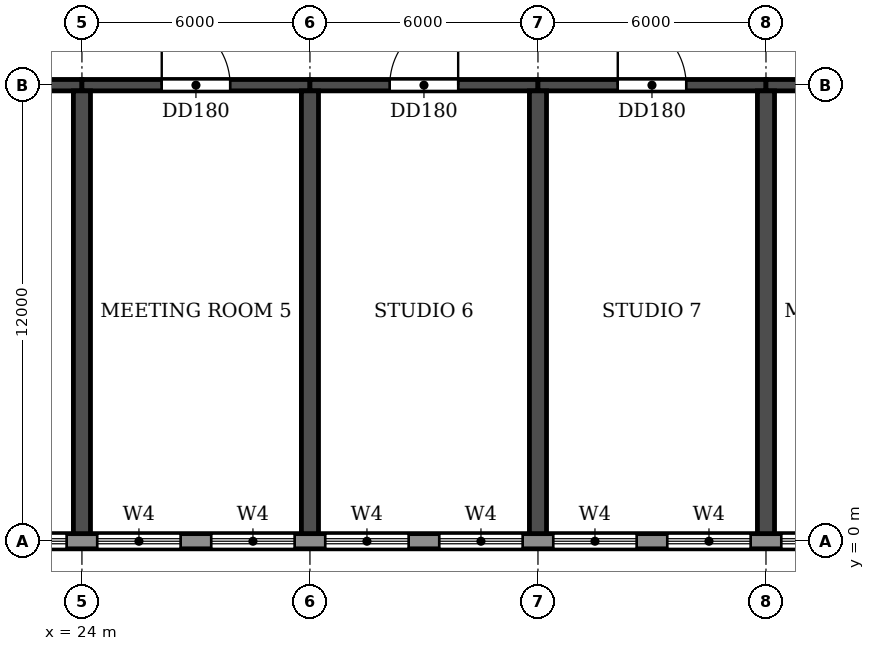
"""IFC4 building model, lengths in metres.
Left out: names, types, materials, properties, quantities, classifications, styles, units other than length and angle.
Written with IfcOpenShell. Run it as: python <this file> out.ifc"""

import sys

from ifc_helpers import new_model, si_unit, direction, frame, frame_2d, origin, place, context, subcontext, project, spatial, rectangle, extrude, element, fill, save


model = new_model("IFC4")
c1 = context("Model", 3, precision=1e-05, world=origin(), true_north=direction((0.0, 1.0)))
c2 = subcontext(c1, "Body", "Model", "MODEL_VIEW")
j1 = project(units=[si_unit("LENGTHUNIT", "METRE"), si_unit("PLANEANGLEUNIT", "RADIAN")], contexts=[c1])
p1 = place(None, origin())
s1 = spatial("IfcSite", under=j1, at=p1, CompositionType="ELEMENT")
p2 = place(p1, origin())
s2 = spatial("IfcBuilding", under=s1, at=p2, CompositionType="ELEMENT")
p3 = place(p2, frame((0.0, 0.0, 19.2)))
s3 = spatial("IfcBuildingStorey", under=s2, at=p3, CompositionType="ELEMENT", Elevation=19.2)
for number, where, z_axis, x_axis in (
    (1, (24.0, 0.2, 0.0), (0.0, 0.0, 1.0), (0.0, 1.0, 0.0)),
    (2, (30.0, 0.2, 0.0), (0.0, 0.0, 1.0), (0.0, 1.0, 0.0)),
    (3, (36.0, 0.2, 0.0), (0.0, 0.0, 1.0), (0.0, 1.0, 0.0)),
    (4, (42.0, 0.2, 0.0), (0.0, 0.0, 1.0), (0.0, 1.0, 0.0)),
):
    element("IfcWall", number, at=place(p3, frame(where, z_axis=z_axis, x_axis=x_axis)), inside=s3, PredefinedType="SHEAR", context=c2, shape_type="SweptSolid", body=[
        extrude(rectangle(XDim=11.65, YDim=0.45, at=frame_2d((5.825, 0.0))), origin(), (0.0, 0.0, 1.0), 3.95),
    ])
p4 = place(p3, frame((18.0, 12.0, 0.0), z_axis=(0.0, 0.0, 1.0), x_axis=(1.0, 0.0, 0.0)))
e5 = element("IfcWall", 5, at=p4, inside=s3, PredefinedType="SHEAR", context=c2, shape_type="SweptSolid", body=[
    extrude(rectangle(XDim=6.0, YDim=0.3, at=frame_2d((3.0, 0.0))), origin(), (0.0, 0.0, 1.0), 3.35),
])
p5 = place(p4, frame((2.1, 0.0, 0.0)))
e6 = element("IfcOpeningElement", 6, at=p5, cuts=e5, PredefinedType="OPENING", context=c2, shape_type="SweptSolid", body=[
    extrude(rectangle(XDim=1.8, YDim=2.1, at=frame_2d((0.9, 1.05))), frame((0.0, 0.16, 0.0), z_axis=(0.0, -1.0, 0.0), x_axis=(1.0, 0.0, 0.0)), (0.0, 0.0, 1.0), 0.32),
])
p6 = place(p3, frame((24.0, 12.0, 0.0), z_axis=(0.0, 0.0, 1.0), x_axis=(1.0, 0.0, 0.0)))
e7 = element("IfcWall", 7, at=p6, inside=s3, PredefinedType="SHEAR", context=c2, shape_type="SweptSolid", body=[
    extrude(rectangle(XDim=6.0, YDim=0.3, at=frame_2d((3.0, 0.0))), origin(), (0.0, 0.0, 1.0), 3.35),
])
p7 = place(p6, frame((2.1, 0.0, 0.0)))
e8 = element("IfcOpeningElement", 8, at=p7, cuts=e7, PredefinedType="OPENING", context=c2, shape_type="SweptSolid", body=[
    extrude(rectangle(XDim=1.8, YDim=2.1, at=frame_2d((0.9, 1.05))), frame((0.0, 0.16, 0.0), z_axis=(0.0, -1.0, 0.0), x_axis=(1.0, 0.0, 0.0)), (0.0, 0.0, 1.0), 0.32),
])
p8 = place(p3, frame((30.0, 12.0, 0.0), z_axis=(0.0, 0.0, 1.0), x_axis=(1.0, 0.0, 0.0)))
e9 = element("IfcWall", 9, at=p8, inside=s3, PredefinedType="SHEAR", context=c2, shape_type="SweptSolid", body=[
    extrude(rectangle(XDim=6.0, YDim=0.3, at=frame_2d((3.0, 0.0))), origin(), (0.0, 0.0, 1.0), 3.35),
])
p9 = place(p8, frame((2.1, 0.0, 0.0)))
e10 = element("IfcOpeningElement", 10, at=p9, cuts=e9, PredefinedType="OPENING", context=c2, shape_type="SweptSolid", body=[
    extrude(rectangle(XDim=1.8, YDim=2.1, at=frame_2d((0.9, 1.05))), frame((0.0, 0.16, 0.0), z_axis=(0.0, -1.0, 0.0), x_axis=(1.0, 0.0, 0.0)), (0.0, 0.0, 1.0), 0.32),
])
p10 = place(p3, frame((36.0, 12.0, 0.0), z_axis=(0.0, 0.0, 1.0), x_axis=(1.0, 0.0, 0.0)))
e11 = element("IfcWall", 11, at=p10, inside=s3, PredefinedType="SHEAR", context=c2, shape_type="SweptSolid", body=[
    extrude(rectangle(XDim=6.0, YDim=0.3, at=frame_2d((3.0, 0.0))), origin(), (0.0, 0.0, 1.0), 3.35),
])
p11 = place(p10, frame((2.1, 0.0, 0.0)))
e12 = element("IfcOpeningElement", 12, at=p11, cuts=e11, PredefinedType="OPENING", context=c2, shape_type="SweptSolid", body=[
    extrude(rectangle(XDim=1.8, YDim=2.1, at=frame_2d((0.9, 1.05))), frame((0.0, 0.16, 0.0), z_axis=(0.0, -1.0, 0.0), x_axis=(1.0, 0.0, 0.0)), (0.0, 0.0, 1.0), 0.32),
])
p12 = place(p3, frame((42.0, 12.0, 0.0), z_axis=(0.0, 0.0, 1.0), x_axis=(1.0, 0.0, 0.0)))
e13 = element("IfcWall", 13, at=p12, inside=s3, PredefinedType="SHEAR", context=c2, shape_type="SweptSolid", body=[
    extrude(rectangle(XDim=6.0, YDim=0.3, at=frame_2d((3.0, 0.0))), origin(), (0.0, 0.0, 1.0), 3.35),
])
p13 = place(p12, frame((2.1, 0.0, 0.0)))
e14 = element("IfcOpeningElement", 14, at=p13, cuts=e13, PredefinedType="OPENING", context=c2, shape_type="SweptSolid", body=[
    extrude(rectangle(XDim=1.8, YDim=2.1, at=frame_2d((0.9, 1.05))), frame((0.0, 0.16, 0.0), z_axis=(0.0, -1.0, 0.0), x_axis=(1.0, 0.0, 0.0)), (0.0, 0.0, 1.0), 0.32),
])
p14 = place(p3, frame((-3.0, 0.0, 0.0), z_axis=(0.0, 0.0, 1.0), x_axis=(1.0, 0.0, 0.0)))
e15 = element("IfcWall", 15, at=p14, inside=s3, PredefinedType="STANDARD", context=c2, shape_type="SweptSolid", body=[
    extrude(rectangle(XDim=108.0, YDim=0.4, at=frame_2d((54.0, 0.0))), origin(), (0.0, 0.0, 1.0), 3.95),
])
p15 = place(p14, frame((3.4, 0.0, 0.9)))
e16 = element("IfcOpeningElement", 16, at=p15, cuts=e15, PredefinedType="OPENING", context=c2, shape_type="SweptSolid", body=[
    extrude(rectangle(XDim=2.2, YDim=2.7, at=frame_2d((1.1, 1.35))), frame((0.0, 0.21, 0.0), z_axis=(0.0, -1.0, 0.0), x_axis=(1.0, 0.0, 0.0)), (0.0, 0.0, 1.0), 0.42),
])
p16 = place(p14, frame((6.4, 0.0, 0.9)))
e17 = element("IfcOpeningElement", 17, at=p16, cuts=e15, PredefinedType="OPENING", context=c2, shape_type="SweptSolid", body=[
    extrude(rectangle(XDim=2.2, YDim=2.7, at=frame_2d((1.1, 1.35))), frame((0.0, 0.21, 0.0), z_axis=(0.0, -1.0, 0.0), x_axis=(1.0, 0.0, 0.0)), (0.0, 0.0, 1.0), 0.42),
])
p17 = place(p14, frame((9.4, 0.0, 0.9)))
e18 = element("IfcOpeningElement", 18, at=p17, cuts=e15, PredefinedType="OPENING", context=c2, shape_type="SweptSolid", body=[
    extrude(rectangle(XDim=2.2, YDim=2.7, at=frame_2d((1.1, 1.35))), frame((0.0, 0.21, 0.0), z_axis=(0.0, -1.0, 0.0), x_axis=(1.0, 0.0, 0.0)), (0.0, 0.0, 1.0), 0.42),
])
p18 = place(p14, frame((12.4, 0.0, 0.9)))
e19 = element("IfcOpeningElement", 19, at=p18, cuts=e15, PredefinedType="OPENING", context=c2, shape_type="SweptSolid", body=[
    extrude(rectangle(XDim=2.2, YDim=2.7, at=frame_2d((1.1, 1.35))), frame((0.0, 0.21, 0.0), z_axis=(0.0, -1.0, 0.0), x_axis=(1.0, 0.0, 0.0)), (0.0, 0.0, 1.0), 0.42),
])
p19 = place(p14, frame((15.4, 0.0, 0.9)))
e20 = element("IfcOpeningElement", 20, at=p19, cuts=e15, PredefinedType="OPENING", context=c2, shape_type="SweptSolid", body=[
    extrude(rectangle(XDim=2.2, YDim=2.7, at=frame_2d((1.1, 1.35))), frame((0.0, 0.21, 0.0), z_axis=(0.0, -1.0, 0.0), x_axis=(1.0, 0.0, 0.0)), (0.0, 0.0, 1.0), 0.42),
])
p20 = place(p14, frame((18.4, 0.0, 0.9)))
e21 = element("IfcOpeningElement", 21, at=p20, cuts=e15, PredefinedType="OPENING", context=c2, shape_type="SweptSolid", body=[
    extrude(rectangle(XDim=2.2, YDim=2.7, at=frame_2d((1.1, 1.35))), frame((0.0, 0.21, 0.0), z_axis=(0.0, -1.0, 0.0), x_axis=(1.0, 0.0, 0.0)), (0.0, 0.0, 1.0), 0.42),
])
p21 = place(p14, frame((21.4, 0.0, 0.9)))
e22 = element("IfcOpeningElement", 22, at=p21, cuts=e15, PredefinedType="OPENING", context=c2, shape_type="SweptSolid", body=[
    extrude(rectangle(XDim=2.2, YDim=2.7, at=frame_2d((1.1, 1.35))), frame((0.0, 0.21, 0.0), z_axis=(0.0, -1.0, 0.0), x_axis=(1.0, 0.0, 0.0)), (0.0, 0.0, 1.0), 0.42),
])
p22 = place(p14, frame((24.4, 0.0, 0.9)))
e23 = element("IfcOpeningElement", 23, at=p22, cuts=e15, PredefinedType="OPENING", context=c2, shape_type="SweptSolid", body=[
    extrude(rectangle(XDim=2.2, YDim=2.7, at=frame_2d((1.1, 1.35))), frame((0.0, 0.21, 0.0), z_axis=(0.0, -1.0, 0.0), x_axis=(1.0, 0.0, 0.0)), (0.0, 0.0, 1.0), 0.42),
])
p23 = place(p14, frame((27.4, 0.0, 0.9)))
e24 = element("IfcOpeningElement", 24, at=p23, cuts=e15, PredefinedType="OPENING", context=c2, shape_type="SweptSolid", body=[
    extrude(rectangle(XDim=2.2, YDim=2.7, at=frame_2d((1.1, 1.35))), frame((0.0, 0.21, 0.0), z_axis=(0.0, -1.0, 0.0), x_axis=(1.0, 0.0, 0.0)), (0.0, 0.0, 1.0), 0.42),
])
p24 = place(p14, frame((30.4, 0.0, 0.9)))
e25 = element("IfcOpeningElement", 25, at=p24, cuts=e15, PredefinedType="OPENING", context=c2, shape_type="SweptSolid", body=[
    extrude(rectangle(XDim=2.2, YDim=2.7, at=frame_2d((1.1, 1.35))), frame((0.0, 0.21, 0.0), z_axis=(0.0, -1.0, 0.0), x_axis=(1.0, 0.0, 0.0)), (0.0, 0.0, 1.0), 0.42),
])
p25 = place(p14, frame((33.4, 0.0, 0.9)))
e26 = element("IfcOpeningElement", 26, at=p25, cuts=e15, PredefinedType="OPENING", context=c2, shape_type="SweptSolid", body=[
    extrude(rectangle(XDim=2.2, YDim=2.7, at=frame_2d((1.1, 1.35))), frame((0.0, 0.21, 0.0), z_axis=(0.0, -1.0, 0.0), x_axis=(1.0, 0.0, 0.0)), (0.0, 0.0, 1.0), 0.42),
])
p26 = place(p14, frame((36.4, 0.0, 0.9)))
e27 = element("IfcOpeningElement", 27, at=p26, cuts=e15, PredefinedType="OPENING", context=c2, shape_type="SweptSolid", body=[
    extrude(rectangle(XDim=2.2, YDim=2.7, at=frame_2d((1.1, 1.35))), frame((0.0, 0.21, 0.0), z_axis=(0.0, -1.0, 0.0), x_axis=(1.0, 0.0, 0.0)), (0.0, 0.0, 1.0), 0.42),
])
p27 = place(p14, frame((39.4, 0.0, 0.9)))
e28 = element("IfcOpeningElement", 28, at=p27, cuts=e15, PredefinedType="OPENING", context=c2, shape_type="SweptSolid", body=[
    extrude(rectangle(XDim=2.2, YDim=2.7, at=frame_2d((1.1, 1.35))), frame((0.0, 0.21, 0.0), z_axis=(0.0, -1.0, 0.0), x_axis=(1.0, 0.0, 0.0)), (0.0, 0.0, 1.0), 0.42),
])
p28 = place(p14, frame((42.4, 0.0, 0.9)))
e29 = element("IfcOpeningElement", 29, at=p28, cuts=e15, PredefinedType="OPENING", context=c2, shape_type="SweptSolid", body=[
    extrude(rectangle(XDim=2.2, YDim=2.7, at=frame_2d((1.1, 1.35))), frame((0.0, 0.21, 0.0), z_axis=(0.0, -1.0, 0.0), x_axis=(1.0, 0.0, 0.0)), (0.0, 0.0, 1.0), 0.42),
])
p29 = place(p14, frame((45.4, 0.0, 0.9)))
e30 = element("IfcOpeningElement", 30, at=p29, cuts=e15, PredefinedType="OPENING", context=c2, shape_type="SweptSolid", body=[
    extrude(rectangle(XDim=2.2, YDim=2.7, at=frame_2d((1.1, 1.35))), frame((0.0, 0.21, 0.0), z_axis=(0.0, -1.0, 0.0), x_axis=(1.0, 0.0, 0.0)), (0.0, 0.0, 1.0), 0.42),
])
p30 = place(p14, frame((48.4, 0.0, 0.9)))
e31 = element("IfcOpeningElement", 31, at=p30, cuts=e15, PredefinedType="OPENING", context=c2, shape_type="SweptSolid", body=[
    extrude(rectangle(XDim=2.2, YDim=2.7, at=frame_2d((1.1, 1.35))), frame((0.0, 0.21, 0.0), z_axis=(0.0, -1.0, 0.0), x_axis=(1.0, 0.0, 0.0)), (0.0, 0.0, 1.0), 0.42),
])
p31 = place(p14, frame((51.4, 0.0, 0.9)))
e32 = element("IfcOpeningElement", 32, at=p31, cuts=e15, PredefinedType="OPENING", context=c2, shape_type="SweptSolid", body=[
    extrude(rectangle(XDim=2.2, YDim=2.7, at=frame_2d((1.1, 1.35))), frame((0.0, 0.21, 0.0), z_axis=(0.0, -1.0, 0.0), x_axis=(1.0, 0.0, 0.0)), (0.0, 0.0, 1.0), 0.42),
])
p32 = place(p14, frame((54.4, 0.0, 0.9)))
e33 = element("IfcOpeningElement", 33, at=p32, cuts=e15, PredefinedType="OPENING", context=c2, shape_type="SweptSolid", body=[
    extrude(rectangle(XDim=2.2, YDim=2.7, at=frame_2d((1.1, 1.35))), frame((0.0, 0.21, 0.0), z_axis=(0.0, -1.0, 0.0), x_axis=(1.0, 0.0, 0.0)), (0.0, 0.0, 1.0), 0.42),
])
p33 = place(p14, frame((57.4, 0.0, 0.9)))
e34 = element("IfcOpeningElement", 34, at=p33, cuts=e15, PredefinedType="OPENING", context=c2, shape_type="SweptSolid", body=[
    extrude(rectangle(XDim=2.2, YDim=2.7, at=frame_2d((1.1, 1.35))), frame((0.0, 0.21, 0.0), z_axis=(0.0, -1.0, 0.0), x_axis=(1.0, 0.0, 0.0)), (0.0, 0.0, 1.0), 0.42),
])
p34 = place(p14, frame((60.4, 0.0, 0.9)))
e35 = element("IfcOpeningElement", 35, at=p34, cuts=e15, PredefinedType="OPENING", context=c2, shape_type="SweptSolid", body=[
    extrude(rectangle(XDim=2.2, YDim=2.7, at=frame_2d((1.1, 1.35))), frame((0.0, 0.21, 0.0), z_axis=(0.0, -1.0, 0.0), x_axis=(1.0, 0.0, 0.0)), (0.0, 0.0, 1.0), 0.42),
])
p35 = place(p14, frame((63.4, 0.0, 0.9)))
e36 = element("IfcOpeningElement", 36, at=p35, cuts=e15, PredefinedType="OPENING", context=c2, shape_type="SweptSolid", body=[
    extrude(rectangle(XDim=2.2, YDim=2.7, at=frame_2d((1.1, 1.35))), frame((0.0, 0.21, 0.0), z_axis=(0.0, -1.0, 0.0), x_axis=(1.0, 0.0, 0.0)), (0.0, 0.0, 1.0), 0.42),
])
p36 = place(p14, frame((66.4, 0.0, 0.9)))
e37 = element("IfcOpeningElement", 37, at=p36, cuts=e15, PredefinedType="OPENING", context=c2, shape_type="SweptSolid", body=[
    extrude(rectangle(XDim=2.2, YDim=2.7, at=frame_2d((1.1, 1.35))), frame((0.0, 0.21, 0.0), z_axis=(0.0, -1.0, 0.0), x_axis=(1.0, 0.0, 0.0)), (0.0, 0.0, 1.0), 0.42),
])
p37 = place(p14, frame((69.4, 0.0, 0.9)))
e38 = element("IfcOpeningElement", 38, at=p37, cuts=e15, PredefinedType="OPENING", context=c2, shape_type="SweptSolid", body=[
    extrude(rectangle(XDim=2.2, YDim=2.7, at=frame_2d((1.1, 1.35))), frame((0.0, 0.21, 0.0), z_axis=(0.0, -1.0, 0.0), x_axis=(1.0, 0.0, 0.0)), (0.0, 0.0, 1.0), 0.42),
])
p38 = place(p14, frame((72.4, 0.0, 0.9)))
e39 = element("IfcOpeningElement", 39, at=p38, cuts=e15, PredefinedType="OPENING", context=c2, shape_type="SweptSolid", body=[
    extrude(rectangle(XDim=2.2, YDim=2.7, at=frame_2d((1.1, 1.35))), frame((0.0, 0.21, 0.0), z_axis=(0.0, -1.0, 0.0), x_axis=(1.0, 0.0, 0.0)), (0.0, 0.0, 1.0), 0.42),
])
p39 = place(p14, frame((75.4, 0.0, 0.9)))
e40 = element("IfcOpeningElement", 40, at=p39, cuts=e15, PredefinedType="OPENING", context=c2, shape_type="SweptSolid", body=[
    extrude(rectangle(XDim=2.2, YDim=2.7, at=frame_2d((1.1, 1.35))), frame((0.0, 0.21, 0.0), z_axis=(0.0, -1.0, 0.0), x_axis=(1.0, 0.0, 0.0)), (0.0, 0.0, 1.0), 0.42),
])
p40 = place(p14, frame((78.4, 0.0, 0.9)))
e41 = element("IfcOpeningElement", 41, at=p40, cuts=e15, PredefinedType="OPENING", context=c2, shape_type="SweptSolid", body=[
    extrude(rectangle(XDim=2.2, YDim=2.7, at=frame_2d((1.1, 1.35))), frame((0.0, 0.21, 0.0), z_axis=(0.0, -1.0, 0.0), x_axis=(1.0, 0.0, 0.0)), (0.0, 0.0, 1.0), 0.42),
])
p41 = place(p14, frame((81.4, 0.0, 0.9)))
e42 = element("IfcOpeningElement", 42, at=p41, cuts=e15, PredefinedType="OPENING", context=c2, shape_type="SweptSolid", body=[
    extrude(rectangle(XDim=2.2, YDim=2.7, at=frame_2d((1.1, 1.35))), frame((0.0, 0.21, 0.0), z_axis=(0.0, -1.0, 0.0), x_axis=(1.0, 0.0, 0.0)), (0.0, 0.0, 1.0), 0.42),
])
p42 = place(p14, frame((84.4, 0.0, 0.9)))
e43 = element("IfcOpeningElement", 43, at=p42, cuts=e15, PredefinedType="OPENING", context=c2, shape_type="SweptSolid", body=[
    extrude(rectangle(XDim=2.2, YDim=2.7, at=frame_2d((1.1, 1.35))), frame((0.0, 0.21, 0.0), z_axis=(0.0, -1.0, 0.0), x_axis=(1.0, 0.0, 0.0)), (0.0, 0.0, 1.0), 0.42),
])
p43 = place(p14, frame((87.4, 0.0, 0.9)))
e44 = element("IfcOpeningElement", 44, at=p43, cuts=e15, PredefinedType="OPENING", context=c2, shape_type="SweptSolid", body=[
    extrude(rectangle(XDim=2.2, YDim=2.7, at=frame_2d((1.1, 1.35))), frame((0.0, 0.21, 0.0), z_axis=(0.0, -1.0, 0.0), x_axis=(1.0, 0.0, 0.0)), (0.0, 0.0, 1.0), 0.42),
])
p44 = place(p14, frame((90.4, 0.0, 0.9)))
e45 = element("IfcOpeningElement", 45, at=p44, cuts=e15, PredefinedType="OPENING", context=c2, shape_type="SweptSolid", body=[
    extrude(rectangle(XDim=2.2, YDim=2.7, at=frame_2d((1.1, 1.35))), frame((0.0, 0.21, 0.0), z_axis=(0.0, -1.0, 0.0), x_axis=(1.0, 0.0, 0.0)), (0.0, 0.0, 1.0), 0.42),
])
p45 = place(p14, frame((93.4, 0.0, 0.9)))
e46 = element("IfcOpeningElement", 46, at=p45, cuts=e15, PredefinedType="OPENING", context=c2, shape_type="SweptSolid", body=[
    extrude(rectangle(XDim=2.2, YDim=2.7, at=frame_2d((1.1, 1.35))), frame((0.0, 0.21, 0.0), z_axis=(0.0, -1.0, 0.0), x_axis=(1.0, 0.0, 0.0)), (0.0, 0.0, 1.0), 0.42),
])
p46 = place(p14, frame((96.4, 0.0, 0.9)))
e47 = element("IfcOpeningElement", 47, at=p46, cuts=e15, PredefinedType="OPENING", context=c2, shape_type="SweptSolid", body=[
    extrude(rectangle(XDim=2.2, YDim=2.7, at=frame_2d((1.1, 1.35))), frame((0.0, 0.21, 0.0), z_axis=(0.0, -1.0, 0.0), x_axis=(1.0, 0.0, 0.0)), (0.0, 0.0, 1.0), 0.42),
])
p47 = place(p14, frame((99.4, 0.0, 0.9)))
e48 = element("IfcOpeningElement", 48, at=p47, cuts=e15, PredefinedType="OPENING", context=c2, shape_type="SweptSolid", body=[
    extrude(rectangle(XDim=2.2, YDim=2.7, at=frame_2d((1.1, 1.35))), frame((0.0, 0.21, 0.0), z_axis=(0.0, -1.0, 0.0), x_axis=(1.0, 0.0, 0.0)), (0.0, 0.0, 1.0), 0.42),
])
p48 = place(p14, frame((102.4, 0.0, 0.9)))
e49 = element("IfcOpeningElement", 49, at=p48, cuts=e15, PredefinedType="OPENING", context=c2, shape_type="SweptSolid", body=[
    extrude(rectangle(XDim=2.2, YDim=2.7, at=frame_2d((1.1, 1.35))), frame((0.0, 0.21, 0.0), z_axis=(0.0, -1.0, 0.0), x_axis=(1.0, 0.0, 0.0)), (0.0, 0.0, 1.0), 0.42),
])
p49 = place(p22, origin())
e50 = element("IfcWindow", 50, at=p49, inside=s3, PartitioningType="DOUBLE_PANEL_HORIZONTAL", PredefinedType="WINDOW", context=c2, shape_type="SweptSolid", body=[
    extrude(rectangle(XDim=2.2, YDim=2.7, at=frame_2d((1.1, 1.35))), frame((0.0, 0.03, 0.0), z_axis=(0.0, -1.0, 0.0), x_axis=(1.0, 0.0, 0.0)), (0.0, 0.0, 1.0), 0.06),
])
fill(e23, e50)
p50 = place(p23, origin())
e51 = element("IfcWindow", 51, at=p50, inside=s3, PartitioningType="DOUBLE_PANEL_HORIZONTAL", PredefinedType="WINDOW", context=c2, shape_type="SweptSolid", body=[
    extrude(rectangle(XDim=2.2, YDim=2.7, at=frame_2d((1.1, 1.35))), frame((0.0, 0.03, 0.0), z_axis=(0.0, -1.0, 0.0), x_axis=(1.0, 0.0, 0.0)), (0.0, 0.0, 1.0), 0.06),
])
fill(e24, e51)
p51 = place(p24, origin())
e52 = element("IfcWindow", 52, at=p51, inside=s3, PartitioningType="DOUBLE_PANEL_HORIZONTAL", PredefinedType="WINDOW", context=c2, shape_type="SweptSolid", body=[
    extrude(rectangle(XDim=2.2, YDim=2.7, at=frame_2d((1.1, 1.35))), frame((0.0, 0.03, 0.0), z_axis=(0.0, -1.0, 0.0), x_axis=(1.0, 0.0, 0.0)), (0.0, 0.0, 1.0), 0.06),
])
fill(e25, e52)
p52 = place(p25, origin())
e53 = element("IfcWindow", 53, at=p52, inside=s3, PartitioningType="DOUBLE_PANEL_HORIZONTAL", PredefinedType="WINDOW", context=c2, shape_type="SweptSolid", body=[
    extrude(rectangle(XDim=2.2, YDim=2.7, at=frame_2d((1.1, 1.35))), frame((0.0, 0.03, 0.0), z_axis=(0.0, -1.0, 0.0), x_axis=(1.0, 0.0, 0.0)), (0.0, 0.0, 1.0), 0.06),
])
fill(e26, e53)
p53 = place(p26, origin())
e54 = element("IfcWindow", 54, at=p53, inside=s3, PartitioningType="DOUBLE_PANEL_HORIZONTAL", PredefinedType="WINDOW", context=c2, shape_type="SweptSolid", body=[
    extrude(rectangle(XDim=2.2, YDim=2.7, at=frame_2d((1.1, 1.35))), frame((0.0, 0.03, 0.0), z_axis=(0.0, -1.0, 0.0), x_axis=(1.0, 0.0, 0.0)), (0.0, 0.0, 1.0), 0.06),
])
fill(e27, e54)
p54 = place(p27, origin())
e55 = element("IfcWindow", 55, at=p54, inside=s3, PartitioningType="DOUBLE_PANEL_HORIZONTAL", PredefinedType="WINDOW", context=c2, shape_type="SweptSolid", body=[
    extrude(rectangle(XDim=2.2, YDim=2.7, at=frame_2d((1.1, 1.35))), frame((0.0, 0.03, 0.0), z_axis=(0.0, -1.0, 0.0), x_axis=(1.0, 0.0, 0.0)), (0.0, 0.0, 1.0), 0.06),
])
fill(e28, e55)
p55 = place(p28, origin())
e56 = element("IfcWindow", 56, at=p55, inside=s3, PartitioningType="DOUBLE_PANEL_HORIZONTAL", PredefinedType="WINDOW", context=c2, shape_type="SweptSolid", body=[
    extrude(rectangle(XDim=2.2, YDim=2.7, at=frame_2d((1.1, 1.35))), frame((0.0, 0.03, 0.0), z_axis=(0.0, -1.0, 0.0), x_axis=(1.0, 0.0, 0.0)), (0.0, 0.0, 1.0), 0.06),
])
fill(e29, e56)
p56 = place(p29, origin())
e57 = element("IfcWindow", 57, at=p56, inside=s3, PartitioningType="DOUBLE_PANEL_HORIZONTAL", PredefinedType="WINDOW", context=c2, shape_type="SweptSolid", body=[
    extrude(rectangle(XDim=2.2, YDim=2.7, at=frame_2d((1.1, 1.35))), frame((0.0, 0.03, 0.0), z_axis=(0.0, -1.0, 0.0), x_axis=(1.0, 0.0, 0.0)), (0.0, 0.0, 1.0), 0.06),
])
fill(e30, e57)
p57 = place(p7, origin())
e58 = element("IfcDoor", 58, at=p57, inside=s3, OperationType="DOUBLE_DOOR_SINGLE_SWING", PredefinedType="DOOR", context=c2, shape_type="SweptSolid", body=[
    extrude(rectangle(XDim=1.8, YDim=2.1, at=frame_2d((0.9, 1.05))), frame((0.0, 0.025, 0.0), z_axis=(0.0, -1.0, 0.0), x_axis=(1.0, 0.0, 0.0)), (0.0, 0.0, 1.0), 0.05),
])
fill(e8, e58)
p58 = place(p9, origin())
e59 = element("IfcDoor", 59, at=p58, inside=s3, OperationType="DOUBLE_DOOR_SINGLE_SWING", PredefinedType="DOOR", context=c2, shape_type="SweptSolid", body=[
    extrude(rectangle(XDim=1.8, YDim=2.1, at=frame_2d((0.9, 1.05))), frame((0.0, 0.025, 0.0), z_axis=(0.0, -1.0, 0.0), x_axis=(1.0, 0.0, 0.0)), (0.0, 0.0, 1.0), 0.05),
])
fill(e10, e59)
p59 = place(p11, origin())
e60 = element("IfcDoor", 60, at=p59, inside=s3, OperationType="DOUBLE_DOOR_SINGLE_SWING", PredefinedType="DOOR", context=c2, shape_type="SweptSolid", body=[
    extrude(rectangle(XDim=1.8, YDim=2.1, at=frame_2d((0.9, 1.05))), frame((0.0, 0.025, 0.0), z_axis=(0.0, -1.0, 0.0), x_axis=(1.0, 0.0, 0.0)), (0.0, 0.0, 1.0), 0.05),
])
fill(e12, e60)
save(model, sys.argv[1])
